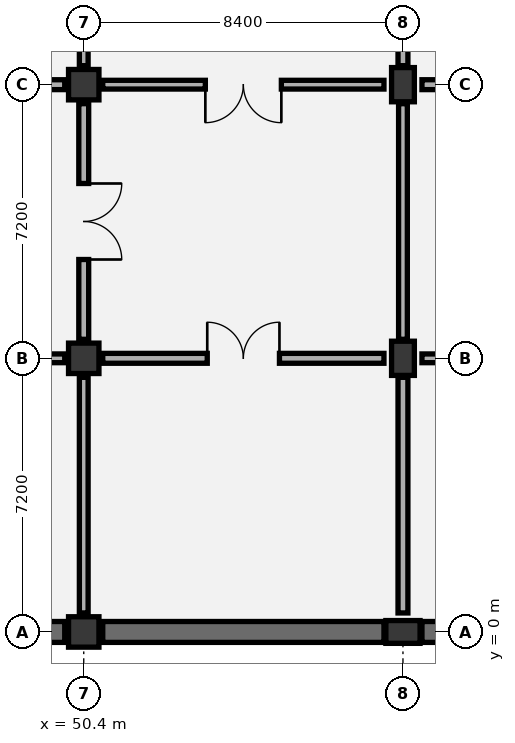
"""IFC4 building model, lengths in metres.
Left out: names, types, materials, properties, quantities, classifications, styles, units other than length and angle.
Written with IfcOpenShell. Run it as: python <this file> out.ifc"""

import sys

from ifc_helpers import new_model, si_unit, direction, frame, frame_2d, origin, origin_2d, place, context, subcontext, project, spatial, rectangle, extrude, element, fill, save


model = new_model("IFC4")
c1 = context("Model", 3, precision=1e-05, world=origin(), true_north=direction((0.0, 1.0)))
c2 = subcontext(c1, "Body", "Model", "MODEL_VIEW")
j1 = project(units=[si_unit("LENGTHUNIT", "METRE"), si_unit("PLANEANGLEUNIT", "RADIAN")], contexts=[c1])
p1 = place(None, origin())
s1 = spatial("IfcSite", under=j1, at=p1, CompositionType="ELEMENT")
p2 = place(p1, origin())
s2 = spatial("IfcBuilding", under=s1, at=p2, CompositionType="ELEMENT")
p3 = place(p2, frame((0.0, 0.0, -9.6)))
s3 = spatial("IfcBuildingStorey", under=s2, at=p3, CompositionType="ELEMENT", Elevation=-9.6)
for number, where, z_axis, x_axis in (
    (1, (50.4, 0.0, 0.0), (0.0, 0.0, 1.0), (1.0, 0.0, 0.0)),
    (2, (50.4, 7.2, 0.0), (0.0, 0.0, 1.0), (1.0, 0.0, 0.0)),
    (3, (50.4, 14.4, 0.0), (0.0, 0.0, 1.0), (1.0, 0.0, 0.0)),
):
    element("IfcColumn", number, at=place(p3, frame(where, z_axis=z_axis, x_axis=x_axis)), inside=s3, PredefinedType="COLUMN", context=c2, shape_type="SweptSolid", body=[
        extrude(rectangle(XDim=0.8, YDim=0.8, at=origin_2d()), origin(), (0.0, 0.0, 1.0), 4.8),
    ])
for number, where, z_axis, x_axis in (
    (4, (58.8, 0.0, 0.0), (0.0, 0.0, 1.0), (0.0, 1.0, 0.0)),
    (5, (58.8, 7.2, 0.0), (0.0, 0.0, 1.0), (1.0, 0.0, 0.0)),
    (6, (58.8, 14.4, 0.0), (0.0, 0.0, 1.0), (1.0, 0.0, 0.0)),
):
    element("IfcColumn", number, at=place(p3, frame(where, z_axis=z_axis, x_axis=x_axis)), inside=s3, PredefinedType="COLUMN", context=c2, shape_type="SweptSolid", body=[
        extrude(rectangle(XDim=0.6, YDim=0.9, at=origin_2d()), origin(), (0.0, 0.0, 1.0), 4.8),
    ])
p4 = place(p3, frame((42.5, 0.0, 0.0), z_axis=(0.0, 0.0, 1.0), x_axis=(1.0, 0.0, 0.0)))
e7 = element("IfcWall", 7, at=p4, inside=s3, PredefinedType="USERDEFINED", context=c2, shape_type="SweptSolid", body=[
    extrude(rectangle(XDim=7.4, YDim=0.55, at=frame_2d((3.7, 0.0))), origin(), (0.0, 0.0, 1.0), 4.4),
])
p5 = place(p3, frame((50.9, 0.0, 0.0), z_axis=(0.0, 0.0, 1.0), x_axis=(1.0, 0.0, 0.0)))
e8 = element("IfcWall", 8, at=p5, inside=s3, PredefinedType="USERDEFINED", context=c2, shape_type="SweptSolid", body=[
    extrude(rectangle(XDim=7.4, YDim=0.55, at=frame_2d((3.7, 0.0))), origin(), (0.0, 0.0, 1.0), 4.4),
])
p6 = place(p3, frame((59.3, 0.0, 0.0), z_axis=(0.0, 0.0, 1.0), x_axis=(1.0, 0.0, 0.0)))
e9 = element("IfcWall", 9, at=p6, inside=s3, PredefinedType="USERDEFINED", context=c2, shape_type="SweptSolid", body=[
    extrude(rectangle(XDim=7.4, YDim=0.55, at=frame_2d((3.7, 0.0))), origin(), (0.0, 0.0, 1.0), 4.4),
])
p7 = place(p3, frame((50.4, 0.5, 0.0), z_axis=(0.0, 0.0, 1.0), x_axis=(0.0, 1.0, 0.0)))
e10 = element("IfcWall", 10, at=p7, inside=s3, PredefinedType="PARTITIONING", context=c2, shape_type="SweptSolid", body=[
    extrude(rectangle(XDim=6.2, YDim=0.23, at=frame_2d((3.1, 0.0))), origin(), (0.0, 0.0, 1.0), 3.595),
])
p8 = place(p3, frame((42.5, 7.2, 0.0), z_axis=(0.0, 0.0, 1.0), x_axis=(1.0, 0.0, 0.0)))
e11 = element("IfcWall", 11, at=p8, inside=s3, PredefinedType="PARTITIONING", context=c2, shape_type="SweptSolid", body=[
    extrude(rectangle(XDim=7.4, YDim=0.23, at=frame_2d((3.7, 0.0))), origin(), (0.0, 0.0, 1.0), 3.495),
])
p9 = place(p8, frame((2.75, 0.0, 0.0)))
e12 = element("IfcOpeningElement", 12, at=p9, cuts=e11, PredefinedType="OPENING", context=c2, shape_type="SweptSolid", body=[
    extrude(rectangle(XDim=1.9, YDim=2.3, at=frame_2d((0.95, 1.15))), frame((0.0, 0.125, 0.0), z_axis=(0.0, -1.0, 0.0), x_axis=(1.0, 0.0, 0.0)), (0.0, 0.0, 1.0), 0.25),
])
p10 = place(p3, frame((50.4, 7.7, 0.0), z_axis=(0.0, 0.0, 1.0), x_axis=(0.0, 1.0, 0.0)))
e13 = element("IfcWall", 13, at=p10, inside=s3, PredefinedType="PARTITIONING", context=c2, shape_type="SweptSolid", body=[
    extrude(rectangle(XDim=6.2, YDim=0.26, at=frame_2d((3.1, 0.0))), origin(), (0.0, 0.0, 1.0), 3.595),
])
p11 = place(p10, frame((2.1, 0.0, 0.0)))
e14 = element("IfcOpeningElement", 14, at=p11, cuts=e13, PredefinedType="OPENING", context=c2, shape_type="SweptSolid", body=[
    extrude(rectangle(XDim=2.0, YDim=2.35, at=frame_2d((1.0, 1.175))), frame((0.0, 0.14, 0.0), z_axis=(0.0, -1.0, 0.0), x_axis=(1.0, 0.0, 0.0)), (0.0, 0.0, 1.0), 0.28),
])
p12 = place(p3, frame((42.5, 14.4, 0.0), z_axis=(0.0, 0.0, 1.0), x_axis=(1.0, 0.0, 0.0)))
e15 = element("IfcWall", 15, at=p12, inside=s3, PredefinedType="PARTITIONING", context=c2, shape_type="SweptSolid", body=[
    extrude(rectangle(XDim=7.4, YDim=0.26, at=frame_2d((3.7, 0.0))), origin(), (0.0, 0.0, 1.0), 3.495),
])
p13 = place(p3, frame((50.4, 14.9, 0.0), z_axis=(0.0, 0.0, 1.0), x_axis=(0.0, 1.0, 0.0)))
e16 = element("IfcWall", 16, at=p13, inside=s3, PredefinedType="PARTITIONING", context=c2, shape_type="SweptSolid", body=[
    extrude(rectangle(XDim=6.2, YDim=0.23, at=frame_2d((3.1, 0.0))), origin(), (0.0, 0.0, 1.0), 3.595),
])
p14 = place(p3, frame((58.8, 0.5, 0.0), z_axis=(0.0, 0.0, 1.0), x_axis=(0.0, 1.0, 0.0)))
e17 = element("IfcWall", 17, at=p14, inside=s3, PredefinedType="PARTITIONING", context=c2, shape_type="SweptSolid", body=[
    extrude(rectangle(XDim=6.2, YDim=0.26, at=frame_2d((3.1, 0.0))), origin(), (0.0, 0.0, 1.0), 3.595),
])
p15 = place(p3, frame((50.9, 7.2, 0.0), z_axis=(0.0, 0.0, 1.0), x_axis=(1.0, 0.0, 0.0)))
e18 = element("IfcWall", 18, at=p15, inside=s3, PredefinedType="PARTITIONING", context=c2, shape_type="SweptSolid", body=[
    extrude(rectangle(XDim=7.4, YDim=0.26, at=frame_2d((3.7, 0.0))), origin(), (0.0, 0.0, 1.0), 3.495),
])
p16 = place(p15, frame((2.75, 0.0, 0.0)))
e19 = element("IfcOpeningElement", 19, at=p16, cuts=e18, PredefinedType="OPENING", context=c2, shape_type="SweptSolid", body=[
    extrude(rectangle(XDim=1.9, YDim=2.3, at=frame_2d((0.95, 1.15))), frame((0.0, 0.14, 0.0), z_axis=(0.0, -1.0, 0.0), x_axis=(1.0, 0.0, 0.0)), (0.0, 0.0, 1.0), 0.28),
])
p17 = place(p3, frame((58.8, 7.7, 0.0), z_axis=(0.0, 0.0, 1.0), x_axis=(0.0, 1.0, 0.0)))
e20 = element("IfcWall", 20, at=p17, inside=s3, PredefinedType="PARTITIONING", context=c2, shape_type="SweptSolid", body=[
    extrude(rectangle(XDim=6.2, YDim=0.23, at=frame_2d((3.1, 0.0))), origin(), (0.0, 0.0, 1.0), 3.595),
])
p18 = place(p3, frame((50.9, 14.4, 0.0), z_axis=(0.0, 0.0, 1.0), x_axis=(1.0, 0.0, 0.0)))
e21 = element("IfcWall", 21, at=p18, inside=s3, PredefinedType="PARTITIONING", context=c2, shape_type="SweptSolid", body=[
    extrude(rectangle(XDim=7.4, YDim=0.23, at=frame_2d((3.7, 0.0))), origin(), (0.0, 0.0, 1.0), 3.495),
])
p19 = place(p18, frame((2.7, 0.0, 0.0)))
e22 = element("IfcOpeningElement", 22, at=p19, cuts=e21, PredefinedType="OPENING", context=c2, shape_type="SweptSolid", body=[
    extrude(rectangle(XDim=2.0, YDim=2.35, at=frame_2d((1.0, 1.175))), frame((0.0, 0.125, 0.0), z_axis=(0.0, -1.0, 0.0), x_axis=(1.0, 0.0, 0.0)), (0.0, 0.0, 1.0), 0.25),
])
p20 = place(p3, frame((58.8, 14.9, 0.0), z_axis=(0.0, 0.0, 1.0), x_axis=(0.0, 1.0, 0.0)))
e23 = element("IfcWall", 23, at=p20, inside=s3, PredefinedType="PARTITIONING", context=c2, shape_type="SweptSolid", body=[
    extrude(rectangle(XDim=6.2, YDim=0.26, at=frame_2d((3.1, 0.0))), origin(), (0.0, 0.0, 1.0), 3.595),
])
p21 = place(p3, frame((59.3, 7.2, 0.0), z_axis=(0.0, 0.0, 1.0), x_axis=(1.0, 0.0, 0.0)))
e24 = element("IfcWall", 24, at=p21, inside=s3, PredefinedType="PARTITIONING", context=c2, shape_type="SweptSolid", body=[
    extrude(rectangle(XDim=7.4, YDim=0.23, at=frame_2d((3.7, 0.0))), origin(), (0.0, 0.0, 1.0), 3.495),
])
p22 = place(p21, frame((2.75, 0.0, 0.0)))
e25 = element("IfcOpeningElement", 25, at=p22, cuts=e24, PredefinedType="OPENING", context=c2, shape_type="SweptSolid", body=[
    extrude(rectangle(XDim=1.9, YDim=2.3, at=frame_2d((0.95, 1.15))), frame((0.0, 0.125, 0.0), z_axis=(0.0, -1.0, 0.0), x_axis=(1.0, 0.0, 0.0)), (0.0, 0.0, 1.0), 0.25),
])
p23 = place(p3, frame((59.3, 14.4, 0.0), z_axis=(0.0, 0.0, 1.0), x_axis=(1.0, 0.0, 0.0)))
e26 = element("IfcWall", 26, at=p23, inside=s3, PredefinedType="PARTITIONING", context=c2, shape_type="SweptSolid", body=[
    extrude(rectangle(XDim=7.4, YDim=0.26, at=frame_2d((3.7, 0.0))), origin(), (0.0, 0.0, 1.0), 3.495),
])
p24 = place(p23, frame((2.7, 0.0, 0.0)))
e27 = element("IfcOpeningElement", 27, at=p24, cuts=e26, PredefinedType="OPENING", context=c2, shape_type="SweptSolid", body=[
    extrude(rectangle(XDim=2.0, YDim=2.35, at=frame_2d((1.0, 1.175))), frame((0.0, 0.14, 0.0), z_axis=(0.0, -1.0, 0.0), x_axis=(1.0, 0.0, 0.0)), (0.0, 0.0, 1.0), 0.28),
])
p25 = place(p11, frame((2.0, 0.0, 0.0), z_axis=(0.0, 0.0, 1.0), x_axis=(-1.0, 0.0, 0.0)))
e28 = element("IfcDoor", 28, at=p25, inside=s3, OperationType="DOUBLE_DOOR_SINGLE_SWING", PredefinedType="DOOR", context=c2, shape_type="SweptSolid", body=[
    extrude(rectangle(XDim=2.0, YDim=2.35, at=frame_2d((1.0, 1.175))), frame((0.0, 0.025, 0.0), z_axis=(0.0, -1.0, 0.0), x_axis=(1.0, 0.0, 0.0)), (0.0, 0.0, 1.0), 0.05),
])
fill(e14, e28)
p26 = place(p16, origin())
e29 = element("IfcDoor", 29, at=p26, inside=s3, OperationType="DOUBLE_DOOR_SINGLE_SWING", PredefinedType="DOOR", context=c2, shape_type="SweptSolid", body=[
    extrude(rectangle(XDim=1.9, YDim=2.3, at=frame_2d((0.95, 1.15))), frame((0.0, 0.025, 0.0), z_axis=(0.0, -1.0, 0.0), x_axis=(1.0, 0.0, 0.0)), (0.0, 0.0, 1.0), 0.05),
])
fill(e19, e29)
p27 = place(p19, frame((2.0, 0.0, 0.0), z_axis=(0.0, 0.0, 1.0), x_axis=(-1.0, 0.0, 0.0)))
e30 = element("IfcDoor", 30, at=p27, inside=s3, OperationType="DOUBLE_DOOR_SINGLE_SWING", PredefinedType="DOOR", context=c2, shape_type="SweptSolid", body=[
    extrude(rectangle(XDim=2.0, YDim=2.35, at=frame_2d((1.0, 1.175))), frame((0.0, 0.025, 0.0), z_axis=(0.0, -1.0, 0.0), x_axis=(1.0, 0.0, 0.0)), (0.0, 0.0, 1.0), 0.05),
])
fill(e22, e30)
save(model, sys.argv[1])
